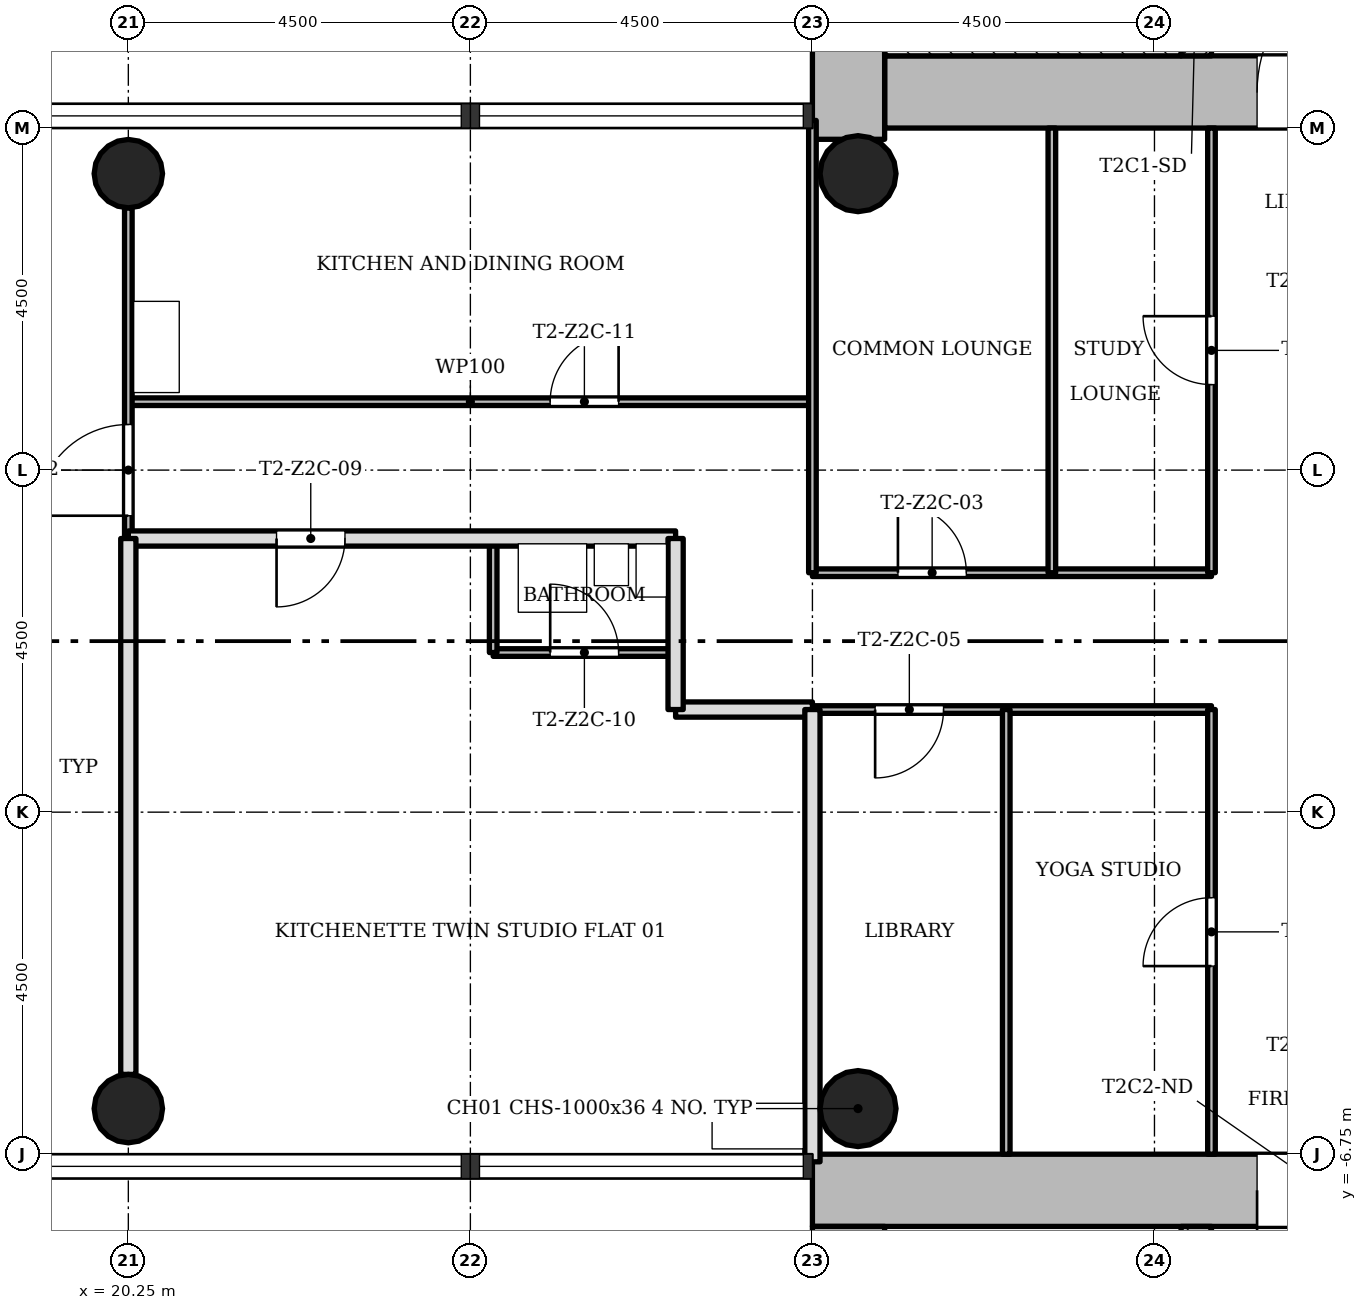
"""IFC4 building model, lengths in metres.
Left out: names, types, materials, properties, quantities, classifications, styles, units other than length and angle.
Written with IfcOpenShell. Run it as: python <this file> out.ifc"""

import sys

from ifc_helpers import new_model, si_unit, direction, frame, frame_2d, origin, origin_2d, place, context, subcontext, project, spatial, rectangle, hollow_circle, extrude, element, fill, save


model = new_model("IFC4")
c1 = context("Model", 3, precision=1e-05, world=origin(), true_north=direction((0.0, 1.0)))
c2 = subcontext(c1, "Body", "Model", "MODEL_VIEW")
j1 = project(units=[si_unit("LENGTHUNIT", "METRE"), si_unit("PLANEANGLEUNIT", "RADIAN")], contexts=[c1])
p1 = place(None, origin())
s1 = spatial("IfcSite", under=j1, at=p1, CompositionType="ELEMENT")
p2 = place(p1, origin())
s2 = spatial("IfcBuilding", under=s1, at=p2, CompositionType="ELEMENT")
p3 = place(p2, frame((0.0, 0.0, 90.2)))
s3 = spatial("IfcBuildingStorey", under=s2, at=p3, CompositionType="ELEMENT", Elevation=90.2)
p4 = place(p3, frame((30.2, 7.225, 0.0), z_axis=(0.0, 0.0, 1.0), x_axis=(1.0, 0.0, 0.0)))
e1 = element("IfcWall", 1, at=p4, inside=s3, PredefinedType="SHEAR", context=c2, shape_type="SweptSolid", body=[
    extrude(rectangle(XDim=12.55, YDim=0.95, at=frame_2d((6.275, 0.0))), origin(), (0.0, 0.0, 1.0), 3.4),
])
p5 = place(p4, frame((4.9, 0.0, 0.0)))
e2 = element("IfcOpeningElement", 2, at=p5, cuts=e1, PredefinedType="OPENING", context=c2, shape_type="SweptSolid", body=[
    extrude(rectangle(XDim=1.8, YDim=2.1, at=frame_2d((0.9, 1.05))), frame((0.0, 0.485, 0.0), z_axis=(0.0, -1.0, 0.0), x_axis=(1.0, 0.0, 0.0)), (0.0, 0.0, 1.0), 0.97),
])
p6 = place(p3, frame((29.725, 15.298, 0.0), z_axis=(0.0, 0.0, 1.0), x_axis=(0.0, -1.0, 0.0)))
e3 = element("IfcWall", 3, at=p6, inside=s3, PredefinedType="SHEAR", context=c2, shape_type="SweptSolid", body=[
    extrude(rectangle(XDim=8.696, YDim=0.95, at=frame_2d((4.348, 0.0))), origin(), (0.0, 0.0, 1.0), 3.4),
])
p7 = place(p3, frame((34.3, 7.7, 0.0), z_axis=(0.0, 0.0, 1.0), x_axis=(0.0, 1.0, 0.0)))
e4 = element("IfcWall", 4, at=p7, inside=s3, PredefinedType="SHEAR", context=c2, shape_type="SweptSolid", body=[
    extrude(rectangle(XDim=7.1, YDim=0.4, at=frame_2d((3.55, 0.0))), origin(), (0.0, 0.0, 1.0), 3.4),
])
p8 = place(p7, frame((0.7, 0.0, 0.0)))
e5 = element("IfcOpeningElement", 5, at=p8, cuts=e4, PredefinedType="OPENING", context=c2, shape_type="SweptSolid", body=[
    extrude(rectangle(XDim=0.9, YDim=2.1, at=frame_2d((0.45, 1.05))), frame((0.0, 0.21, 0.0), z_axis=(0.0, -1.0, 0.0), x_axis=(1.0, 0.0, 0.0)), (0.0, 0.0, 1.0), 0.42),
])
p9 = place(p3, frame((41.8, -7.225, 0.0), z_axis=(0.0, 0.0, 1.0), x_axis=(-1.0, 0.0, 0.0)))
e6 = element("IfcWall", 6, at=p9, inside=s3, PredefinedType="SHEAR", context=c2, shape_type="SweptSolid", body=[
    extrude(rectangle(XDim=12.55, YDim=0.95, at=frame_2d((6.275, 0.0))), origin(), (0.0, 0.0, 1.0), 3.4),
])
p10 = place(p9, frame((4.9, 0.0, 0.0)))
e7 = element("IfcOpeningElement", 7, at=p10, cuts=e6, PredefinedType="OPENING", context=c2, shape_type="SweptSolid", body=[
    extrude(rectangle(XDim=1.8, YDim=2.1, at=frame_2d((0.9, 1.05))), frame((0.0, 0.485, 0.0), z_axis=(0.0, -1.0, 0.0), x_axis=(1.0, 0.0, 0.0)), (0.0, 0.0, 1.0), 0.97),
])
p11 = place(p3, frame((29.725, -7.7, 0.0), z_axis=(0.0, 0.0, 1.0), x_axis=(0.0, -1.0, 0.0)))
e8 = element("IfcWall", 8, at=p11, inside=s3, PredefinedType="SHEAR", context=c2, shape_type="SweptSolid", body=[
    extrude(rectangle(XDim=8.05, YDim=0.95, at=frame_2d((4.025, 0.0))), origin(), (0.0, 0.0, 1.0), 3.4),
])
p12 = place(p3, frame((34.3, -14.8, 0.0), z_axis=(0.0, 0.0, 1.0), x_axis=(0.0, 1.0, 0.0)))
e9 = element("IfcWall", 9, at=p12, inside=s3, PredefinedType="SHEAR", context=c2, shape_type="SweptSolid", body=[
    extrude(rectangle(XDim=7.1, YDim=0.4, at=frame_2d((3.55, 0.0))), origin(), (0.0, 0.0, 1.0), 3.4),
])
p13 = place(p12, frame((5.2, 0.0, 0.0)))
e10 = element("IfcOpeningElement", 10, at=p13, cuts=e9, PredefinedType="OPENING", context=c2, shape_type="SweptSolid", body=[
    extrude(rectangle(XDim=1.1, YDim=2.1, at=frame_2d((0.55, 1.05))), frame((0.0, 0.21, 0.0), z_axis=(0.0, -1.0, 0.0), x_axis=(1.0, 0.0, 0.0)), (0.0, 0.0, 1.0), 0.42),
])
for number, where, z_axis, x_axis in (
    (11, (20.25, 6.15, 0.0), (0.0, 0.0, 1.0), (1.0, 0.0, 0.0)),
    (12, (20.25, -6.15, 0.0), (0.0, 0.0, 1.0), (1.0, 0.0, 0.0)),
):
    element("IfcColumn", number, at=place(p3, frame(where, z_axis=z_axis, x_axis=x_axis)), inside=s3, PredefinedType="COLUMN", context=c2, shape_type="SweptSolid", body=[
        extrude(hollow_circle(Radius=0.45, WallThickness=0.032, at=origin_2d()), origin(), (0.0, 0.0, 1.0), 3.4),
    ])
for number, where, z_axis, x_axis in (
    (13, (29.85, 6.15, 0.0), (0.0, 0.0, 1.0), (1.0, 0.0, 0.0)),
    (14, (29.85, -6.15, 0.0), (0.0, 0.0, 1.0), (1.0, 0.0, 0.0)),
):
    element("IfcColumn", number, at=place(p3, frame(where, z_axis=z_axis, x_axis=x_axis)), inside=s3, PredefinedType="COLUMN", context=c2, shape_type="SweptSolid", body=[
        extrude(hollow_circle(Radius=0.5, WallThickness=0.036, at=origin_2d()), origin(), (0.0, 0.0, 1.0), 3.4),
    ])
p14 = place(p3, frame((34.5, -0.9, 0.0), z_axis=(0.0, 0.0, 1.0), x_axis=(-1.0, 0.0, 0.0)))
e15 = element("IfcWall", 15, at=p14, inside=s3, PredefinedType="PARTITIONING", context=c2, shape_type="SweptSolid", body=[
    extrude(rectangle(XDim=5.25, YDim=0.1, at=frame_2d((2.625, 0.0))), origin(), (0.0, 0.0, 1.0), 3.0),
])
p15 = place(p14, frame((3.525, 0.0, 0.0)))
e16 = element("IfcOpeningElement", 16, at=p15, cuts=e15, PredefinedType="OPENING", context=c2, shape_type="SweptSolid", body=[
    extrude(rectangle(XDim=0.9, YDim=2.1, at=frame_2d((0.45, 1.05))), frame((0.0, 0.06, 0.0), z_axis=(0.0, -1.0, 0.0), x_axis=(1.0, 0.0, 0.0)), (0.0, 0.0, 1.0), 0.12),
])
p16 = place(p3, frame((29.25, -0.9, 0.0), z_axis=(0.0, 0.0, 1.0), x_axis=(-1.0, 0.0, 0.0)))
e17 = element("IfcWall", 17, at=p16, inside=s3, PredefinedType="SOLIDWALL", context=c2, shape_type="SweptSolid", body=[
    extrude(rectangle(XDim=1.8, YDim=0.2, at=frame_2d((0.9, 0.0))), origin(), (0.0, 0.0, 1.0), 3.0),
])
p17 = place(p3, frame((27.45, -0.15, 0.0), z_axis=(0.0, 0.0, 1.0), x_axis=(-1.0, 0.0, 0.0)))
e18 = element("IfcWall", 18, at=p17, inside=s3, PredefinedType="PARTITIONING", context=c2, shape_type="SweptSolid", body=[
    extrude(rectangle(XDim=2.4, YDim=0.1, at=frame_2d((1.2, 0.0))), origin(), (0.0, 0.0, 1.0), 3.0),
])
p18 = place(p17, frame((0.75, 0.0, 0.0)))
e19 = element("IfcOpeningElement", 19, at=p18, cuts=e18, PredefinedType="OPENING", context=c2, shape_type="SweptSolid", body=[
    extrude(rectangle(XDim=0.9, YDim=2.1, at=frame_2d((0.45, 1.05))), frame((0.0, 0.06, 0.0), z_axis=(0.0, -1.0, 0.0), x_axis=(1.0, 0.0, 0.0)), (0.0, 0.0, 1.0), 0.12),
])
p19 = place(p3, frame((34.5, 0.9, 0.0), z_axis=(0.0, 0.0, 1.0), x_axis=(-1.0, 0.0, 0.0)))
e20 = element("IfcWall", 20, at=p19, inside=s3, PredefinedType="PARTITIONING", context=c2, shape_type="SweptSolid", body=[
    extrude(rectangle(XDim=5.25, YDim=0.1, at=frame_2d((2.625, 0.0))), origin(), (0.0, 0.0, 1.0), 3.0),
])
p20 = place(p19, frame((3.225, 0.0, 0.0)))
e21 = element("IfcOpeningElement", 21, at=p20, cuts=e20, PredefinedType="OPENING", context=c2, shape_type="SweptSolid", body=[
    extrude(rectangle(XDim=0.9, YDim=2.1, at=frame_2d((0.45, 1.05))), frame((0.0, 0.06, 0.0), z_axis=(0.0, -1.0, 0.0), x_axis=(1.0, 0.0, 0.0)), (0.0, 0.0, 1.0), 0.12),
])
p21 = place(p3, frame((27.45, 1.35, 0.0), z_axis=(0.0, 0.0, 1.0), x_axis=(-1.0, 0.0, 0.0)))
e22 = element("IfcWall", 22, at=p21, inside=s3, PredefinedType="SOLIDWALL", context=c2, shape_type="SweptSolid", body=[
    extrude(rectangle(XDim=7.2, YDim=0.2, at=frame_2d((3.6, 0.0))), origin(), (0.0, 0.0, 1.0), 3.0),
])
p22 = place(p21, frame((4.35, 0.0, 0.0)))
e23 = element("IfcOpeningElement", 23, at=p22, cuts=e22, PredefinedType="OPENING", context=c2, shape_type="SweptSolid", body=[
    extrude(rectangle(XDim=0.9, YDim=2.1, at=frame_2d((0.45, 1.05))), frame((0.0, 0.11, 0.0), z_axis=(0.0, -1.0, 0.0), x_axis=(1.0, 0.0, 0.0)), (0.0, 0.0, 1.0), 0.22),
])
p23 = place(p3, frame((29.25, 3.15, 0.0), z_axis=(0.0, 0.0, 1.0), x_axis=(-1.0, 0.0, 0.0)))
e24 = element("IfcWall", 24, at=p23, inside=s3, PredefinedType="PARTITIONING", context=c2, shape_type="SweptSolid", body=[
    extrude(rectangle(XDim=9.0, YDim=0.1, at=frame_2d((4.5, 0.0))), origin(), (0.0, 0.0, 1.0), 3.0),
])
p24 = place(p23, frame((2.55, 0.0, 0.0)))
e25 = element("IfcOpeningElement", 25, at=p24, cuts=e24, PredefinedType="OPENING", context=c2, shape_type="SweptSolid", body=[
    extrude(rectangle(XDim=0.9, YDim=2.1, at=frame_2d((0.45, 1.05))), frame((0.0, 0.06, 0.0), z_axis=(0.0, -1.0, 0.0), x_axis=(1.0, 0.0, 0.0)), (0.0, 0.0, 1.0), 0.12),
])
p25 = place(p3, frame((34.5, -6.75, 0.0), z_axis=(0.0, 0.0, 1.0), x_axis=(0.0, 1.0, 0.0)))
e26 = element("IfcWall", 26, at=p25, inside=s3, PredefinedType="PARTITIONING", context=c2, shape_type="SweptSolid", body=[
    extrude(rectangle(XDim=5.85, YDim=0.1, at=frame_2d((2.925, 0.0))), origin(), (0.0, 0.0, 1.0), 3.0),
])
p26 = place(p25, frame((2.475, 0.0, 0.0)))
e27 = element("IfcOpeningElement", 27, at=p26, cuts=e26, PredefinedType="OPENING", context=c2, shape_type="SweptSolid", body=[
    extrude(rectangle(XDim=0.9, YDim=2.1, at=frame_2d((0.45, 1.05))), frame((0.0, 0.06, 0.0), z_axis=(0.0, -1.0, 0.0), x_axis=(1.0, 0.0, 0.0)), (0.0, 0.0, 1.0), 0.12),
])
p27 = place(p3, frame((34.5, 0.9, 0.0), z_axis=(0.0, 0.0, 1.0), x_axis=(0.0, 1.0, 0.0)))
e28 = element("IfcWall", 28, at=p27, inside=s3, PredefinedType="PARTITIONING", context=c2, shape_type="SweptSolid", body=[
    extrude(rectangle(XDim=5.85, YDim=0.1, at=frame_2d((2.925, 0.0))), origin(), (0.0, 0.0, 1.0), 3.0),
])
p28 = place(p27, frame((2.475, 0.0, 0.0)))
e29 = element("IfcOpeningElement", 29, at=p28, cuts=e28, PredefinedType="OPENING", context=c2, shape_type="SweptSolid", body=[
    extrude(rectangle(XDim=0.9, YDim=2.1, at=frame_2d((0.45, 1.05))), frame((0.0, 0.06, 0.0), z_axis=(0.0, -1.0, 0.0), x_axis=(1.0, 0.0, 0.0)), (0.0, 0.0, 1.0), 0.12),
])
for number, where, z_axis, x_axis in (
    (30, (32.4, 0.9, 0.0), (0.0, 0.0, 1.0), (0.0, 1.0, 0.0)),
    (31, (31.8, -6.75, 0.0), (0.0, 0.0, 1.0), (0.0, 1.0, 0.0)),
):
    element("IfcWall", number, at=place(p3, frame(where, z_axis=z_axis, x_axis=x_axis)), inside=s3, PredefinedType="PARTITIONING", context=c2, shape_type="SweptSolid", body=[
        extrude(rectangle(XDim=5.85, YDim=0.1, at=frame_2d((2.925, 0.0))), origin(), (0.0, 0.0, 1.0), 3.0),
    ])
p29 = place(p3, frame((29.25, 0.9, 0.0), z_axis=(0.0, 0.0, 1.0), x_axis=(0.0, 1.0, 0.0)))
e32 = element("IfcWall", 32, at=p29, inside=s3, PredefinedType="PARTITIONING", context=c2, shape_type="SweptSolid", body=[
    extrude(rectangle(XDim=5.95, YDim=0.1, at=frame_2d((2.975, 0.0))), origin(), (0.0, 0.0, 1.0), 3.0),
])
p30 = place(p3, frame((29.25, -6.85, 0.0), z_axis=(0.0, 0.0, 1.0), x_axis=(0.0, 1.0, 0.0)))
e33 = element("IfcWall", 33, at=p30, inside=s3, PredefinedType="SOLIDWALL", context=c2, shape_type="SweptSolid", body=[
    extrude(rectangle(XDim=5.95, YDim=0.2, at=frame_2d((2.975, 0.0))), origin(), (0.0, 0.0, 1.0), 3.0),
])
p31 = place(p3, frame((27.45, -0.9, 0.0), z_axis=(0.0, 0.0, 1.0), x_axis=(0.0, 1.0, 0.0)))
e34 = element("IfcWall", 34, at=p31, inside=s3, PredefinedType="SOLIDWALL", context=c2, shape_type="SweptSolid", body=[
    extrude(rectangle(XDim=2.25, YDim=0.2, at=frame_2d((1.125, 0.0))), origin(), (0.0, 0.0, 1.0), 3.0),
])
p32 = place(p3, frame((25.05, -0.15, 0.0), z_axis=(0.0, 0.0, 1.0), x_axis=(0.0, 1.0, 0.0)))
e35 = element("IfcWall", 35, at=p32, inside=s3, PredefinedType="PARTITIONING", context=c2, shape_type="SweptSolid", body=[
    extrude(rectangle(XDim=1.5, YDim=0.1, at=frame_2d((0.75, 0.0))), origin(), (0.0, 0.0, 1.0), 3.0),
])
p33 = place(p3, frame((20.25, 1.35, 0.0), z_axis=(0.0, 0.0, 1.0), x_axis=(0.0, 1.0, 0.0)))
e36 = element("IfcWall", 36, at=p33, inside=s3, PredefinedType="PARTITIONING", context=c2, shape_type="SweptSolid", body=[
    extrude(rectangle(XDim=4.35, YDim=0.1, at=frame_2d((2.175, 0.0))), origin(), (0.0, 0.0, 1.0), 3.0),
])
p34 = place(p33, frame((0.3, 0.0, 0.0)))
e37 = element("IfcOpeningElement", 37, at=p34, cuts=e36, PredefinedType="OPENING", context=c2, shape_type="SweptSolid", body=[
    extrude(rectangle(XDim=1.2, YDim=2.1, at=frame_2d((0.6, 1.05))), frame((0.0, 0.06, 0.0), z_axis=(0.0, -1.0, 0.0), x_axis=(1.0, 0.0, 0.0)), (0.0, 0.0, 1.0), 0.12),
])
p35 = place(p3, frame((20.25, -5.7, 0.0), z_axis=(0.0, 0.0, 1.0), x_axis=(0.0, 1.0, 0.0)))
e38 = element("IfcWall", 38, at=p35, inside=s3, PredefinedType="SOLIDWALL", context=c2, shape_type="SweptSolid", body=[
    extrude(rectangle(XDim=7.05, YDim=0.2, at=frame_2d((3.525, 0.0))), origin(), (0.0, 0.0, 1.0), 3.0),
])
p36 = place(p3, frame((34.1, 7.825, 0.0), z_axis=(0.0, 0.0, 1.0), x_axis=(-1.0, 0.0, 0.0)))
e39 = element("IfcWall", 39, at=p36, inside=s3, PredefinedType="SHEAR", context=c2, shape_type="SweptSolid", body=[
    extrude(rectangle(XDim=3.9, YDim=0.25, at=frame_2d((1.95, 0.0))), origin(), (0.0, 0.0, 1.0), 3.4),
])
p37 = place(p28, origin())
e40 = element("IfcDoor", 40, at=p37, inside=s3, OperationType="SINGLE_SWING_LEFT", PredefinedType="DOOR", context=c2, shape_type="SweptSolid", body=[
    extrude(rectangle(XDim=0.9, YDim=2.1, at=frame_2d((0.45, 1.05))), frame((0.0, 0.025, 0.0), z_axis=(0.0, -1.0, 0.0), x_axis=(1.0, 0.0, 0.0)), (0.0, 0.0, 1.0), 0.05),
])
fill(e29, e40)
p38 = place(p20, origin())
e41 = element("IfcDoor", 41, at=p38, inside=s3, OperationType="SINGLE_SWING_RIGHT", PredefinedType="DOOR", context=c2, shape_type="SweptSolid", body=[
    extrude(rectangle(XDim=0.9, YDim=2.1, at=frame_2d((0.45, 1.05))), frame((0.0, 0.025, 0.0), z_axis=(0.0, -1.0, 0.0), x_axis=(1.0, 0.0, 0.0)), (0.0, 0.0, 1.0), 0.05),
])
fill(e21, e41)
p39 = place(p26, origin())
e42 = element("IfcDoor", 42, at=p39, inside=s3, OperationType="SINGLE_SWING_RIGHT", PredefinedType="DOOR", context=c2, shape_type="SweptSolid", body=[
    extrude(rectangle(XDim=0.9, YDim=2.1, at=frame_2d((0.45, 1.05))), frame((0.0, 0.025, 0.0), z_axis=(0.0, -1.0, 0.0), x_axis=(1.0, 0.0, 0.0)), (0.0, 0.0, 1.0), 0.05),
])
fill(e27, e42)
p40 = place(p15, origin())
e43 = element("IfcDoor", 43, at=p40, inside=s3, OperationType="SINGLE_SWING_LEFT", PredefinedType="DOOR", context=c2, shape_type="SweptSolid", body=[
    extrude(rectangle(XDim=0.9, YDim=2.1, at=frame_2d((0.45, 1.05))), frame((0.0, 0.025, 0.0), z_axis=(0.0, -1.0, 0.0), x_axis=(1.0, 0.0, 0.0)), (0.0, 0.0, 1.0), 0.05),
])
fill(e16, e43)
p41 = place(p22, origin())
e44 = element("IfcDoor", 44, at=p41, inside=s3, OperationType="SINGLE_SWING_LEFT", PredefinedType="DOOR", context=c2, shape_type="SweptSolid", body=[
    extrude(rectangle(XDim=0.9, YDim=2.1, at=frame_2d((0.45, 1.05))), frame((0.0, 0.025, 0.0), z_axis=(0.0, -1.0, 0.0), x_axis=(1.0, 0.0, 0.0)), (0.0, 0.0, 1.0), 0.05),
])
fill(e23, e44)
p42 = place(p18, origin())
e45 = element("IfcDoor", 45, at=p42, inside=s3, OperationType="SINGLE_SWING_RIGHT", PredefinedType="DOOR", context=c2, shape_type="SweptSolid", body=[
    extrude(rectangle(XDim=0.9, YDim=2.1, at=frame_2d((0.45, 1.05))), frame((0.0, 0.025, 0.0), z_axis=(0.0, -1.0, 0.0), x_axis=(1.0, 0.0, 0.0)), (0.0, 0.0, 1.0), 0.05),
])
fill(e19, e45)
p43 = place(p24, origin())
e46 = element("IfcDoor", 46, at=p43, inside=s3, OperationType="SINGLE_SWING_LEFT", PredefinedType="DOOR", context=c2, shape_type="SweptSolid", body=[
    extrude(rectangle(XDim=0.9, YDim=2.1, at=frame_2d((0.45, 1.05))), frame((0.0, 0.025, 0.0), z_axis=(0.0, -1.0, 0.0), x_axis=(1.0, 0.0, 0.0)), (0.0, 0.0, 1.0), 0.05),
])
fill(e25, e46)
p44 = place(p34, origin())
e47 = element("IfcDoor", 47, at=p44, inside=s3, OperationType="SINGLE_SWING_RIGHT", PredefinedType="DOOR", context=c2, shape_type="SweptSolid", body=[
    extrude(rectangle(XDim=1.2, YDim=2.1, at=frame_2d((0.6, 1.05))), frame((0.0, 0.025, 0.0), z_axis=(0.0, -1.0, 0.0), x_axis=(1.0, 0.0, 0.0)), (0.0, 0.0, 1.0), 0.05),
])
fill(e37, e47)
p45 = place(p5, origin())
e48 = element("IfcDoor", 48, at=p45, inside=s3, OperationType="SINGLE_SWING_LEFT", PredefinedType="DOOR", context=c2, shape_type="SweptSolid", body=[
    extrude(rectangle(XDim=1.8, YDim=2.1, at=frame_2d((0.9, 1.05))), frame((0.0, 0.025, 0.0), z_axis=(0.0, -1.0, 0.0), x_axis=(1.0, 0.0, 0.0)), (0.0, 0.0, 1.0), 0.05),
])
fill(e2, e48)
p46 = place(p10, origin())
e49 = element("IfcDoor", 49, at=p46, inside=s3, OperationType="SINGLE_SWING_LEFT", PredefinedType="DOOR", context=c2, shape_type="SweptSolid", body=[
    extrude(rectangle(XDim=1.8, YDim=2.1, at=frame_2d((0.9, 1.05))), frame((0.0, 0.025, 0.0), z_axis=(0.0, -1.0, 0.0), x_axis=(1.0, 0.0, 0.0)), (0.0, 0.0, 1.0), 0.05),
])
fill(e7, e49)
save(model, sys.argv[1])
